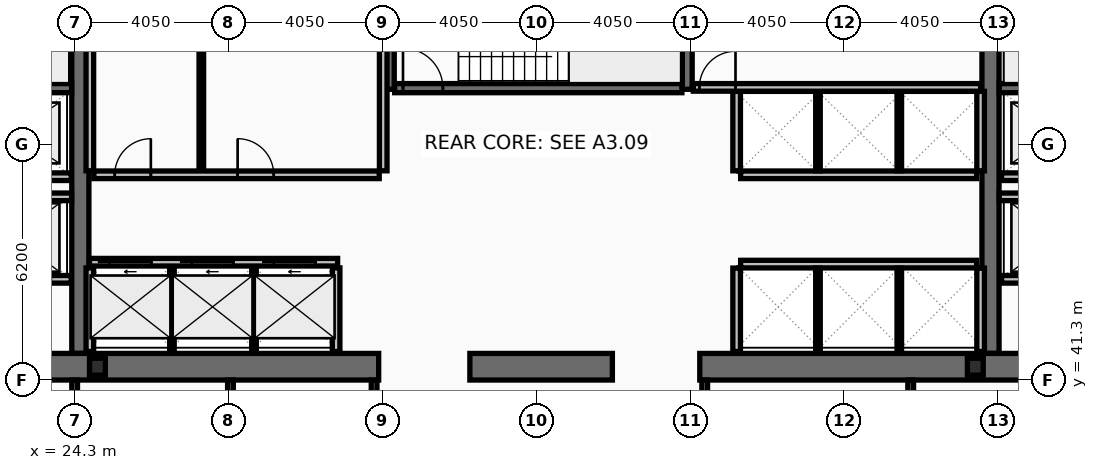
"""IFC4 building model, lengths in metres.
Left out: names, types, materials, properties, quantities, classifications, styles, units other than length and angle.
Written with IfcOpenShell. Run it as: python <this file> out.ifc"""

import sys

from ifc_helpers import new_model, si_unit, direction, frame, frame_2d, origin, origin_2d, place, context, subcontext, project, spatial, rectangle, i_section, extrude, element, fill, save


model = new_model("IFC4")
c1 = context("Model", 3, precision=1e-05, world=origin(), true_north=direction((0.0, 1.0)))
c2 = subcontext(c1, "Body", "Model", "MODEL_VIEW")
j1 = project(units=[si_unit("LENGTHUNIT", "METRE"), si_unit("PLANEANGLEUNIT", "RADIAN")], contexts=[c1])
p1 = place(None, origin())
s1 = spatial("IfcSite", under=j1, at=p1, CompositionType="ELEMENT")
p2 = place(p1, origin())
s2 = spatial("IfcBuilding", under=s1, at=p2, CompositionType="ELEMENT")
p3 = place(p2, frame((0.0, 0.0, 125.4)))
s3 = spatial("IfcBuildingStorey", under=s2, at=p3, CompositionType="ELEMENT", Elevation=125.4)
for number, where, z_axis, x_axis in (
    (1, (24.45, 42.0, 0.0), (0.0, 0.0, 1.0), (0.0, 1.0, 0.0)),
    (2, (48.4, 42.0, 0.0), (0.0, 0.0, 1.0), (0.0, 1.0, 0.0)),
):
    element("IfcWall", number, at=place(p3, frame(where, z_axis=z_axis, x_axis=x_axis)), inside=s3, PredefinedType="SHEAR", context=c2, shape_type="SweptSolid", body=[
        extrude(rectangle(XDim=11.0, YDim=0.45, at=frame_2d((5.5, 0.0))), origin(), (0.0, 0.0, 1.0), 3.44),
    ])
p4 = place(p3, frame((32.3, 41.65, 0.0), z_axis=(0.0, 0.0, 1.0), x_axis=(-1.0, 0.0, 0.0)))
e3 = element("IfcWall", 3, at=p4, inside=s3, PredefinedType="SHEAR", context=c2, shape_type="SweptSolid", body=[
    extrude(rectangle(XDim=11.45, YDim=0.7, at=frame_2d((5.725, 0.0))), origin(), (0.0, 0.0, 1.0), 3.44),
])
p5 = place(p3, frame((38.45, 41.65, 0.0), z_axis=(0.0, 0.0, 1.0), x_axis=(-1.0, 0.0, 0.0)))
e4 = element("IfcWall", 4, at=p5, inside=s3, PredefinedType="SHEAR", context=c2, shape_type="SweptSolid", body=[
    extrude(rectangle(XDim=3.75, YDim=0.7, at=frame_2d((1.875, 0.0))), origin(), (0.0, 0.0, 1.0), 3.44),
])
p6 = place(p3, frame((52.05, 41.65, 0.0), z_axis=(0.0, 0.0, 1.0), x_axis=(-1.0, 0.0, 0.0)))
e5 = element("IfcWall", 5, at=p6, inside=s3, PredefinedType="SHEAR", context=c2, shape_type="SweptSolid", body=[
    extrude(rectangle(XDim=11.3, YDim=0.7, at=frame_2d((5.65, 0.0))), origin(), (0.0, 0.0, 1.0), 3.44),
])
for number, where, z_axis, x_axis in (
    (6, (32.58, 48.95, 0.0), (0.0, 0.0, 1.0), (0.0, 1.0, 0.0)),
    (7, (40.42, 48.95, 0.0), (0.0, 0.0, 1.0), (0.0, 1.0, 0.0)),
):
    element("IfcWall", number, at=place(p3, frame(where, z_axis=z_axis, x_axis=x_axis)), inside=s3, PredefinedType="SHEAR", context=c2, shape_type="SweptSolid", body=[
        extrude(rectangle(XDim=4.05, YDim=0.26, at=frame_2d((2.025, 0.0))), origin(), (0.0, 0.0, 1.0), 3.44),
    ])
p7 = place(p3, frame((16.9, 48.98, 0.0), z_axis=(0.0, 0.0, 1.0), x_axis=(1.0, 0.0, 0.0)))
e8 = element("IfcWall", 8, at=p7, inside=s3, PredefinedType="SHEAR", context=c2, shape_type="SweptSolid", body=[
    extrude(rectangle(XDim=7.32, YDim=0.24, at=frame_2d((3.66, 0.0))), origin(), (0.0, 0.0, 1.0), 3.44),
])
p8 = place(p7, frame((0.22, 0.0, 0.0)))
e9 = element("IfcOpeningElement", 9, at=p8, cuts=e8, PredefinedType="OPENING", context=c2, shape_type="SweptSolid", body=[
    extrude(rectangle(XDim=1.05, YDim=2.15, at=frame_2d((0.525, 1.075))), frame((0.0, 0.13, 0.0), z_axis=(0.0, -1.0, 0.0), x_axis=(1.0, 0.0, 0.0)), (0.0, 0.0, 1.0), 0.26),
])
p9 = place(p3, frame((48.63, 48.98, 0.0), z_axis=(0.0, 0.0, 1.0), x_axis=(1.0, 0.0, 0.0)))
e10 = element("IfcWall", 10, at=p9, inside=s3, PredefinedType="SHEAR", context=c2, shape_type="SweptSolid", body=[
    extrude(rectangle(XDim=7.37, YDim=0.24, at=frame_2d((3.685, 0.0))), origin(), (0.0, 0.0, 1.0), 3.44),
])
p10 = place(p9, frame((6.1, 0.0, 0.0)))
e11 = element("IfcOpeningElement", 11, at=p10, cuts=e10, PredefinedType="OPENING", context=c2, shape_type="SweptSolid", body=[
    extrude(rectangle(XDim=1.05, YDim=2.15, at=frame_2d((0.525, 1.075))), frame((0.0, 0.13, 0.0), z_axis=(0.0, -1.0, 0.0), x_axis=(1.0, 0.0, 0.0)), (0.0, 0.0, 1.0), 0.26),
])
p11 = place(p3, frame((32.72, 48.98, 0.0), z_axis=(0.0, 0.0, 1.0), x_axis=(1.0, 0.0, 0.0)))
e12 = element("IfcWall", 12, at=p11, inside=s3, PredefinedType="SHEAR", context=c2, shape_type="SweptSolid", body=[
    extrude(rectangle(XDim=7.56, YDim=0.24, at=frame_2d((3.78, 0.0))), origin(), (0.0, 0.0, 1.0), 3.44),
])
p12 = place(p11, frame((0.22, 0.0, 0.0)))
e13 = element("IfcOpeningElement", 13, at=p12, cuts=e12, PredefinedType="OPENING", context=c2, shape_type="SweptSolid", body=[
    extrude(rectangle(XDim=1.05, YDim=2.15, at=frame_2d((0.525, 1.075))), frame((0.0, 0.13, 0.0), z_axis=(0.0, -1.0, 0.0), x_axis=(1.0, 0.0, 0.0)), (0.0, 0.0, 1.0), 0.26),
])
for number, where, z_axis, x_axis in (
    (14, (24.9, 41.65, 0.0), (0.0, 0.0, 1.0), (1.0, 0.0, 0.0)),
    (15, (48.0, 41.65, 0.0), (0.0, 0.0, 1.0), (1.0, 0.0, 0.0)),
):
    element("IfcColumn", number, at=place(p3, frame(where, z_axis=z_axis, x_axis=x_axis)), inside=s3, PredefinedType="COLUMN", context=c2, shape_type="SweptSolid", body=[
        extrude(i_section(OverallWidth=0.416, OverallDepth=0.446, WebThickness=0.039, FlangeThickness=0.063, at=origin_2d()), origin(), (0.0, 0.0, 1.0), 3.6),
    ])
p13 = place(p3, frame((24.69, 44.4, 0.0), z_axis=(0.0, 0.0, 1.0), x_axis=(1.0, 0.0, 0.0)))
e16 = element("IfcWall", 16, at=p13, inside=s3, PredefinedType="PARTITIONING", context=c2, shape_type="SweptSolid", body=[
    extrude(rectangle(XDim=6.53, YDim=0.2, at=frame_2d((3.265, 0.0))), origin(), (0.0, 0.0, 1.0), 3.44),
])
p14 = place(p13, frame((0.53, 0.0, 0.0)))
e17 = element("IfcOpeningElement", 17, at=p14, cuts=e16, PredefinedType="OPENING", context=c2, shape_type="SweptSolid", body=[
    extrude(rectangle(XDim=1.1, YDim=2.18, at=frame_2d((0.55, 1.09))), frame((0.0, 0.11, 0.0), z_axis=(0.0, -1.0, 0.0), x_axis=(1.0, 0.0, 0.0)), (0.0, 0.0, 1.0), 0.22),
])
p15 = place(p13, frame((2.69, 0.0, 0.0)))
e18 = element("IfcOpeningElement", 18, at=p15, cuts=e16, PredefinedType="OPENING", context=c2, shape_type="SweptSolid", body=[
    extrude(rectangle(XDim=1.1, YDim=2.18, at=frame_2d((0.55, 1.09))), frame((0.0, 0.11, 0.0), z_axis=(0.0, -1.0, 0.0), x_axis=(1.0, 0.0, 0.0)), (0.0, 0.0, 1.0), 0.22),
])
p16 = place(p13, frame((4.85, 0.0, 0.0)))
e19 = element("IfcOpeningElement", 19, at=p16, cuts=e16, PredefinedType="OPENING", context=c2, shape_type="SweptSolid", body=[
    extrude(rectangle(XDim=1.1, YDim=2.18, at=frame_2d((0.55, 1.09))), frame((0.0, 0.11, 0.0), z_axis=(0.0, -1.0, 0.0), x_axis=(1.0, 0.0, 0.0)), (0.0, 0.0, 1.0), 0.22),
])
p17 = place(p3, frame((51.61, 43.95, 0.0), z_axis=(0.0, 0.0, 1.0), x_axis=(-1.0, 0.0, 0.0)))
e20 = element("IfcWall", 20, at=p17, inside=s3, PredefinedType="PARTITIONING", context=c2, shape_type="SweptSolid", body=[
    extrude(rectangle(XDim=2.92, YDim=0.2, at=frame_2d((1.46, 0.0))), origin(), (0.0, 0.0, 1.0), 3.44),
])
p18 = place(p17, frame((0.81, 0.0, 0.0)))
e21 = element("IfcOpeningElement", 21, at=p18, cuts=e20, PredefinedType="OPENING", context=c2, shape_type="SweptSolid", body=[
    extrude(rectangle(XDim=1.3, YDim=2.18, at=frame_2d((0.65, 1.09))), frame((0.0, 0.11, 0.0), z_axis=(0.0, -1.0, 0.0), x_axis=(1.0, 0.0, 0.0)), (0.0, 0.0, 1.0), 0.22),
])
p19 = place(p3, frame((24.21, 43.95, 0.0), z_axis=(0.0, 0.0, 1.0), x_axis=(-1.0, 0.0, 0.0)))
e22 = element("IfcWall", 22, at=p19, inside=s3, PredefinedType="PARTITIONING", context=c2, shape_type="SweptSolid", body=[
    extrude(rectangle(XDim=2.97, YDim=0.2, at=frame_2d((1.485, 0.0))), origin(), (0.0, 0.0, 1.0), 3.44),
])
p20 = place(p19, frame((0.86, 0.0, 0.0)))
e23 = element("IfcOpeningElement", 23, at=p20, cuts=e22, PredefinedType="OPENING", context=c2, shape_type="SweptSolid", body=[
    extrude(rectangle(XDim=1.3, YDim=2.18, at=frame_2d((0.65, 1.09))), frame((0.0, 0.11, 0.0), z_axis=(0.0, -1.0, 0.0), x_axis=(1.0, 0.0, 0.0)), (0.0, 0.0, 1.0), 0.22),
])
p21 = place(p3, frame((51.61, 46.65, 0.0), z_axis=(0.0, 0.0, 1.0), x_axis=(-1.0, 0.0, 0.0)))
e24 = element("IfcWall", 24, at=p21, inside=s3, PredefinedType="PARTITIONING", context=c2, shape_type="SweptSolid", body=[
    extrude(rectangle(XDim=2.92, YDim=0.2, at=frame_2d((1.46, 0.0))), origin(), (0.0, 0.0, 1.0), 3.44),
])
p22 = place(p21, frame((0.86, 0.0, 0.0)))
e25 = element("IfcOpeningElement", 25, at=p22, cuts=e24, PredefinedType="OPENING", context=c2, shape_type="SweptSolid", body=[
    extrude(rectangle(XDim=1.2, YDim=2.18, at=frame_2d((0.6, 1.09))), frame((0.0, 0.11, 0.0), z_axis=(0.0, -1.0, 0.0), x_axis=(1.0, 0.0, 0.0)), (0.0, 0.0, 1.0), 0.22),
])
p23 = place(p3, frame((24.21, 46.65, 0.0), z_axis=(0.0, 0.0, 1.0), x_axis=(-1.0, 0.0, 0.0)))
e26 = element("IfcWall", 26, at=p23, inside=s3, PredefinedType="PARTITIONING", context=c2, shape_type="SweptSolid", body=[
    extrude(rectangle(XDim=2.97, YDim=0.2, at=frame_2d((1.485, 0.0))), origin(), (0.0, 0.0, 1.0), 3.44),
])
p24 = place(p23, frame((0.91, 0.0, 0.0)))
e27 = element("IfcOpeningElement", 27, at=p24, cuts=e26, PredefinedType="OPENING", context=c2, shape_type="SweptSolid", body=[
    extrude(rectangle(XDim=1.2, YDim=2.18, at=frame_2d((0.6, 1.09))), frame((0.0, 0.11, 0.0), z_axis=(0.0, -1.0, 0.0), x_axis=(1.0, 0.0, 0.0)), (0.0, 0.0, 1.0), 0.22),
])
p25 = place(p3, frame((21.2, 46.12, 0.0), z_axis=(0.0, 0.0, 1.0), x_axis=(1.0, 0.0, 0.0)))
e28 = element("IfcWall", 28, at=p25, inside=s3, PredefinedType="PARTITIONING", context=c2, shape_type="SweptSolid", body=[
    extrude(rectangle(XDim=3.02, YDim=0.2, at=frame_2d((1.51, 0.0))), origin(), (0.0, 0.0, 1.0), 3.44),
])
p26 = place(p3, frame((48.63, 46.12, 0.0), z_axis=(0.0, 0.0, 1.0), x_axis=(1.0, 0.0, 0.0)))
e29 = element("IfcWall", 29, at=p26, inside=s3, PredefinedType="PARTITIONING", context=c2, shape_type="SweptSolid", body=[
    extrude(rectangle(XDim=3.07, YDim=0.2, at=frame_2d((1.535, 0.0))), origin(), (0.0, 0.0, 1.0), 3.44),
])
for number, where, z_axis, x_axis in (
    (30, (24.7, 46.805, 0.0), (0.0, 0.0, 1.0), (0.0, 1.0, 0.0)),
    (31, (32.42, 46.805, 0.0), (0.0, 0.0, 1.0), (0.0, 1.0, 0.0)),
):
    element("IfcWall", number, at=place(p3, frame(where, z_axis=z_axis, x_axis=x_axis)), inside=s3, PredefinedType="PARTITIONING", context=c2, shape_type="SweptSolid", body=[
        extrude(rectangle(XDim=5.99, YDim=0.2, at=frame_2d((2.995, 0.0))), origin(), (0.0, 0.0, 1.0), 3.44),
    ])
p27 = place(p3, frame((27.634, 46.805, 0.0), z_axis=(0.0, 0.0, 1.0), x_axis=(0.0, 1.0, 0.0)))
e32 = element("IfcWall", 32, at=p27, inside=s3, PredefinedType="PARTITIONING", context=c2, shape_type="SweptSolid", body=[
    extrude(rectangle(XDim=5.99, YDim=0.12, at=frame_2d((2.995, 0.0))), origin(), (0.0, 0.0, 1.0), 3.44),
])
p28 = place(p3, frame((24.805, 46.7, 0.0), z_axis=(0.0, 0.0, 1.0), x_axis=(1.0, 0.0, 0.0)))
e33 = element("IfcWall", 33, at=p28, inside=s3, PredefinedType="PARTITIONING", context=c2, shape_type="SweptSolid", body=[
    extrude(rectangle(XDim=7.51, YDim=0.2, at=frame_2d((3.755, 0.0))), origin(), (0.0, 0.0, 1.0), 3.44),
])
p29 = place(p28, frame((0.55, 0.0, 0.0)))
e34 = element("IfcOpeningElement", 34, at=p29, cuts=e33, PredefinedType="OPENING", context=c2, shape_type="SweptSolid", body=[
    extrude(rectangle(XDim=0.95, YDim=2.1, at=frame_2d((0.475, 1.05))), frame((0.0, 0.11, 0.0), z_axis=(0.0, -1.0, 0.0), x_axis=(1.0, 0.0, 0.0)), (0.0, 0.0, 1.0), 0.22),
])
p30 = place(p28, frame((3.784, 0.0, 0.0)))
e35 = element("IfcOpeningElement", 35, at=p30, cuts=e33, PredefinedType="OPENING", context=c2, shape_type="SweptSolid", body=[
    extrude(rectangle(XDim=0.95, YDim=2.1, at=frame_2d((0.475, 1.05))), frame((0.0, 0.11, 0.0), z_axis=(0.0, -1.0, 0.0), x_axis=(1.0, 0.0, 0.0)), (0.0, 0.0, 1.0), 0.22),
])
for number, where, z_axis, x_axis in (
    (36, (24.7, 42.05, 0.0), (0.0, 0.0, 1.0), (0.0, 1.0, 0.0)),
    (37, (31.18, 42.05, 0.0), (0.0, 0.0, 1.0), (0.0, 1.0, 0.0)),
):
    element("IfcWall", number, at=place(p3, frame(where, z_axis=z_axis, x_axis=x_axis)), inside=s3, PredefinedType="PARTITIONING", context=c2, shape_type="SweptSolid", body=[
        extrude(rectangle(XDim=2.2, YDim=0.2, at=frame_2d((1.1, 0.0))), origin(), (0.0, 0.0, 1.0), 3.44),
    ])
for number, where, z_axis, x_axis in (
    (38, (26.86, 42.05, 0.0), (0.0, 0.0, 1.0), (0.0, 1.0, 0.0)),
    (39, (29.02, 42.05, 0.0), (0.0, 0.0, 1.0), (0.0, 1.0, 0.0)),
):
    element("IfcWall", number, at=place(p3, frame(where, z_axis=z_axis, x_axis=x_axis)), inside=s3, PredefinedType="PARTITIONING", context=c2, shape_type="SweptSolid", body=[
        extrude(rectangle(XDim=2.2, YDim=0.12, at=frame_2d((1.1, 0.0))), origin(), (0.0, 0.0, 1.0), 3.44),
    ])
p31 = place(p3, frame((41.825, 46.7, 0.0), z_axis=(0.0, 0.0, 1.0), x_axis=(1.0, 0.0, 0.0)))
e40 = element("IfcWall", 40, at=p31, inside=s3, PredefinedType="PARTITIONING", context=c2, shape_type="SweptSolid", body=[
    extrude(rectangle(XDim=6.21, YDim=0.2, at=frame_2d((3.105, 0.0))), origin(), (0.0, 0.0, 1.0), 3.44),
])
for number, where, z_axis, x_axis in (
    (41, (41.72, 46.805, 0.0), (0.0, 0.0, 1.0), (0.0, 1.0, 0.0)),
    (42, (48.14, 46.805, 0.0), (0.0, 0.0, 1.0), (0.0, 1.0, 0.0)),
):
    element("IfcWall", number, at=place(p3, frame(where, z_axis=z_axis, x_axis=x_axis)), inside=s3, PredefinedType="PARTITIONING", context=c2, shape_type="SweptSolid", body=[
        extrude(rectangle(XDim=2.09, YDim=0.2, at=frame_2d((1.045, 0.0))), origin(), (0.0, 0.0, 1.0), 3.44),
    ])
for number, where, z_axis, x_axis in (
    (43, (43.86, 46.805, 0.0), (0.0, 0.0, 1.0), (0.0, 1.0, 0.0)),
    (44, (46.0, 46.805, 0.0), (0.0, 0.0, 1.0), (0.0, 1.0, 0.0)),
):
    element("IfcWall", number, at=place(p3, frame(where, z_axis=z_axis, x_axis=x_axis)), inside=s3, PredefinedType="PARTITIONING", context=c2, shape_type="SweptSolid", body=[
        extrude(rectangle(XDim=2.09, YDim=0.12, at=frame_2d((1.045, 0.0))), origin(), (0.0, 0.0, 1.0), 3.44),
    ])
p32 = place(p3, frame((41.825, 44.35, 0.0), z_axis=(0.0, 0.0, 1.0), x_axis=(1.0, 0.0, 0.0)))
e45 = element("IfcWall", 45, at=p32, inside=s3, PredefinedType="PARTITIONING", context=c2, shape_type="SweptSolid", body=[
    extrude(rectangle(XDim=6.21, YDim=0.2, at=frame_2d((3.105, 0.0))), origin(), (0.0, 0.0, 1.0), 3.44),
])
for number, where, z_axis, x_axis in (
    (46, (41.72, 42.05, 0.0), (0.0, 0.0, 1.0), (0.0, 1.0, 0.0)),
    (47, (48.14, 42.05, 0.0), (0.0, 0.0, 1.0), (0.0, 1.0, 0.0)),
):
    element("IfcWall", number, at=place(p3, frame(where, z_axis=z_axis, x_axis=x_axis)), inside=s3, PredefinedType="PARTITIONING", context=c2, shape_type="SweptSolid", body=[
        extrude(rectangle(XDim=2.195, YDim=0.2, at=frame_2d((1.098, 0.0))), origin(), (0.0, 0.0, 1.0), 3.44),
    ])
for number, where, z_axis, x_axis in (
    (48, (43.86, 42.05, 0.0), (0.0, 0.0, 1.0), (0.0, 1.0, 0.0)),
    (49, (46.0, 42.05, 0.0), (0.0, 0.0, 1.0), (0.0, 1.0, 0.0)),
):
    element("IfcWall", number, at=place(p3, frame(where, z_axis=z_axis, x_axis=x_axis)), inside=s3, PredefinedType="PARTITIONING", context=c2, shape_type="SweptSolid", body=[
        extrude(rectangle(XDim=2.195, YDim=0.12, at=frame_2d((1.098, 0.0))), origin(), (0.0, 0.0, 1.0), 3.44),
    ])
p33 = place(p3, frame((40.58, 49.0, 0.0), z_axis=(0.0, 0.0, 1.0), x_axis=(1.0, 0.0, 0.0)))
e50 = element("IfcWall", 50, at=p33, inside=s3, PredefinedType="PARTITIONING", context=c2, shape_type="SweptSolid", body=[
    extrude(rectangle(XDim=7.56, YDim=0.2, at=frame_2d((3.78, 0.0))), origin(), (0.0, 0.0, 1.0), 3.44),
])
p34 = place(p33, frame((0.16, 0.0, 0.0)))
e51 = element("IfcOpeningElement", 51, at=p34, cuts=e50, PredefinedType="OPENING", context=c2, shape_type="SweptSolid", body=[
    extrude(rectangle(XDim=0.95, YDim=2.1, at=frame_2d((0.475, 1.05))), frame((0.0, 0.11, 0.0), z_axis=(0.0, -1.0, 0.0), x_axis=(1.0, 0.0, 0.0)), (0.0, 0.0, 1.0), 0.22),
])
for number, where, z_axis, x_axis in (
    (52, (24.3, 38.28, 0.0), (0.0, 0.0, 1.0), (0.0, 1.0, 0.0)),
    (53, (28.4, 38.28, 0.0), (0.0, 0.0, 1.0), (0.0, 1.0, 0.0)),
    (54, (32.18, 38.28, 0.0), (0.0, 0.0, 1.0), (0.0, 1.0, 0.0)),
    (55, (40.88, 38.28, 0.0), (0.0, 0.0, 1.0), (0.0, 1.0, 0.0)),
    (56, (46.3, 38.28, 0.0), (0.0, 0.0, 1.0), (0.0, 1.0, 0.0)),
):
    element("IfcWall", number, at=place(p3, frame(where, z_axis=z_axis, x_axis=x_axis)), inside=s3, PredefinedType="PARTITIONING", context=c2, shape_type="SweptSolid", body=[
        extrude(rectangle(XDim=3.02, YDim=0.15, at=frame_2d((1.51, 0.0))), origin(), (0.0, 0.0, 1.0), 3.44),
    ])
p35 = place(p12, origin())
e57 = element("IfcDoor", 57, at=p35, inside=s3, OperationType="SINGLE_SWING_LEFT", PredefinedType="DOOR", context=c2, shape_type="SweptSolid", body=[
    extrude(rectangle(XDim=1.05, YDim=2.15, at=frame_2d((0.525, 1.075))), frame((0.0, 0.025, 0.0), z_axis=(0.0, -1.0, 0.0), x_axis=(1.0, 0.0, 0.0)), (0.0, 0.0, 1.0), 0.05),
])
fill(e13, e57)
p36 = place(p14, origin())
e58 = element("IfcDoor", 58, at=p36, inside=s3, OperationType="SLIDING_TO_LEFT", PredefinedType="DOOR", context=c2, shape_type="SweptSolid", body=[
    extrude(rectangle(XDim=1.1, YDim=2.18, at=frame_2d((0.55, 1.09))), frame((0.0, 0.025, 0.0), z_axis=(0.0, -1.0, 0.0), x_axis=(1.0, 0.0, 0.0)), (0.0, 0.0, 1.0), 0.05),
])
fill(e17, e58)
p37 = place(p15, origin())
e59 = element("IfcDoor", 59, at=p37, inside=s3, OperationType="SLIDING_TO_LEFT", PredefinedType="DOOR", context=c2, shape_type="SweptSolid", body=[
    extrude(rectangle(XDim=1.1, YDim=2.18, at=frame_2d((0.55, 1.09))), frame((0.0, 0.025, 0.0), z_axis=(0.0, -1.0, 0.0), x_axis=(1.0, 0.0, 0.0)), (0.0, 0.0, 1.0), 0.05),
])
fill(e18, e59)
p38 = place(p16, origin())
e60 = element("IfcDoor", 60, at=p38, inside=s3, OperationType="SLIDING_TO_LEFT", PredefinedType="DOOR", context=c2, shape_type="SweptSolid", body=[
    extrude(rectangle(XDim=1.1, YDim=2.18, at=frame_2d((0.55, 1.09))), frame((0.0, 0.025, 0.0), z_axis=(0.0, -1.0, 0.0), x_axis=(1.0, 0.0, 0.0)), (0.0, 0.0, 1.0), 0.05),
])
fill(e19, e60)
p39 = place(p29, origin())
e61 = element("IfcDoor", 61, at=p39, inside=s3, OperationType="SINGLE_SWING_RIGHT", PredefinedType="DOOR", context=c2, shape_type="SweptSolid", body=[
    extrude(rectangle(XDim=0.95, YDim=2.1, at=frame_2d((0.475, 1.05))), frame((0.0, 0.025, 0.0), z_axis=(0.0, -1.0, 0.0), x_axis=(1.0, 0.0, 0.0)), (0.0, 0.0, 1.0), 0.05),
])
fill(e34, e61)
p40 = place(p30, origin())
e62 = element("IfcDoor", 62, at=p40, inside=s3, OperationType="SINGLE_SWING_LEFT", PredefinedType="DOOR", context=c2, shape_type="SweptSolid", body=[
    extrude(rectangle(XDim=0.95, YDim=2.1, at=frame_2d((0.475, 1.05))), frame((0.0, 0.025, 0.0), z_axis=(0.0, -1.0, 0.0), x_axis=(1.0, 0.0, 0.0)), (0.0, 0.0, 1.0), 0.05),
])
fill(e35, e62)
p41 = place(p34, origin())
e63 = element("IfcDoor", 63, at=p41, inside=s3, OperationType="SINGLE_SWING_RIGHT", PredefinedType="DOOR", context=c2, shape_type="SweptSolid", body=[
    extrude(rectangle(XDim=0.95, YDim=2.1, at=frame_2d((0.475, 1.05))), frame((0.0, 0.025, 0.0), z_axis=(0.0, -1.0, 0.0), x_axis=(1.0, 0.0, 0.0)), (0.0, 0.0, 1.0), 0.05),
])
fill(e51, e63)
save(model, sys.argv[1])
